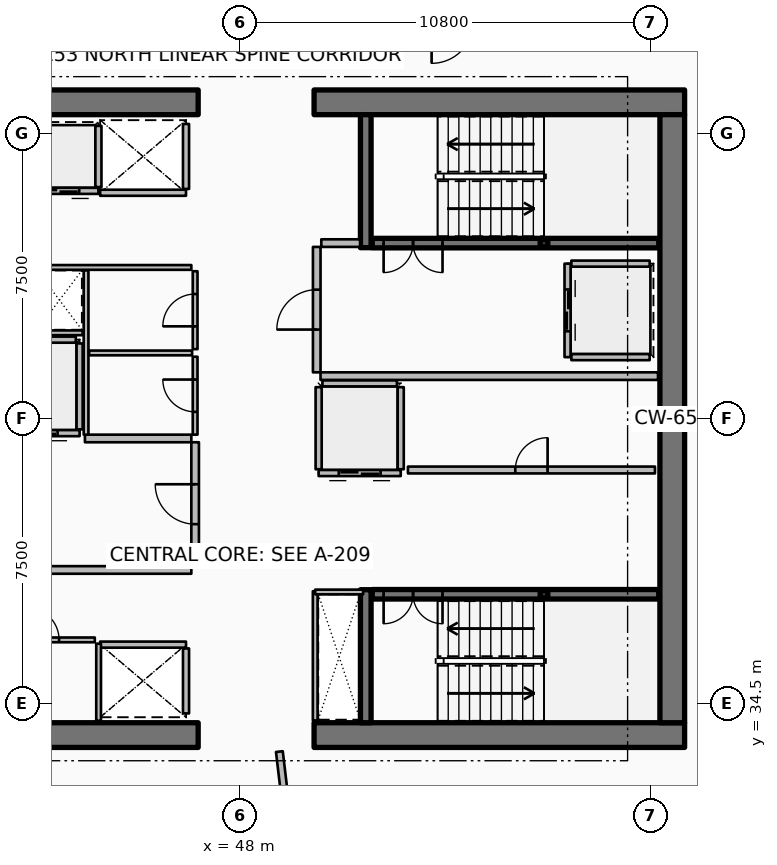
"""IFC4 building model, lengths in metres.
Left out: names, types, materials, properties, quantities, classifications, styles, units other than length and angle.
Written with IfcOpenShell. Run it as: python <this file> out.ifc"""

import sys

from ifc_helpers import new_model, si_unit, direction, frame, frame_2d, origin, origin_2d, place, context, subcontext, project, spatial, rectangle, hollow_rectangle, extrude, element, fill, save


model = new_model("IFC4")
c1 = context("Model", 3, precision=1e-05, world=origin(), true_north=direction((0.0, 1.0)))
c2 = subcontext(c1, "Body", "Model", "MODEL_VIEW")
j1 = project(units=[si_unit("LENGTHUNIT", "METRE"), si_unit("PLANEANGLEUNIT", "RADIAN")], contexts=[c1])
p1 = place(None, origin())
s1 = spatial("IfcSite", under=j1, at=p1, CompositionType="ELEMENT")
p2 = place(p1, origin())
s2 = spatial("IfcBuilding", under=s1, at=p2, CompositionType="ELEMENT")
p3 = place(p2, frame((0.0, 0.0, 210.3)))
s3 = spatial("IfcBuildingStorey", under=s2, at=p3, CompositionType="ELEMENT", Elevation=210.3)
for number, where, z_axis, x_axis in (
    (1, (37.15, 33.675, 0.0), (0.0, 0.0, 1.0), (1.0, 0.0, 0.0)),
    (2, (49.95, 33.675, 0.0), (0.0, 0.0, 1.0), (1.0, 0.0, 0.0)),
    (3, (37.15, 50.325, 0.0), (0.0, 0.0, 1.0), (1.0, 0.0, 0.0)),
    (4, (49.95, 50.325, 0.0), (0.0, 0.0, 1.0), (1.0, 0.0, 0.0)),
):
    element("IfcWall", number, at=place(p3, frame(where, z_axis=z_axis, x_axis=x_axis)), inside=s3, PredefinedType="SHEAR", context=c2, shape_type="SweptSolid", body=[
        extrude(rectangle(XDim=9.75, YDim=0.65, at=frame_2d((4.875, 0.0))), origin(), (0.0, 0.0, 1.0), 3.75),
    ])
p4 = place(p3, frame((59.375, 34.0, 0.0), z_axis=(0.0, 0.0, 1.0), x_axis=(0.0, 1.0, 0.0)))
e5 = element("IfcWall", 5, at=p4, inside=s3, PredefinedType="SHEAR", context=c2, shape_type="SweptSolid", body=[
    extrude(rectangle(XDim=16.0, YDim=0.65, at=frame_2d((8.0, 0.0))), origin(), (0.0, 0.0, 1.0), 3.75),
])
for number, where, z_axis, x_axis in (
    (6, (51.31, 46.5, 0.0), (0.0, 0.0, 1.0), (0.0, 1.0, 0.0)),
    (7, (51.31, 34.0, 0.0), (0.0, 0.0, 1.0), (0.0, 1.0, 0.0)),
):
    element("IfcWall", number, at=place(p3, frame(where, z_axis=z_axis, x_axis=x_axis)), inside=s3, PredefinedType="SHEAR", context=c2, shape_type="SweptSolid", body=[
        extrude(rectangle(XDim=3.5, YDim=0.28, at=frame_2d((1.75, 0.0))), origin(), (0.0, 0.0, 1.0), 3.75),
    ])
for number, where, z_axis, x_axis in (
    (8, (56.0, 46.62, 0.0), (0.0, 0.0, 1.0), (1.0, 0.0, 0.0)),
    (9, (56.0, 37.38, 0.0), (0.0, 0.0, 1.0), (1.0, 0.0, 0.0)),
):
    element("IfcColumn", number, at=place(p3, frame(where, z_axis=z_axis, x_axis=x_axis)), inside=s3, PredefinedType="COLUMN", context=c2, shape_type="SweptSolid", body=[
        extrude(hollow_rectangle(XDim=0.2, YDim=0.2, WallThickness=0.01, InnerFilletRadius=0.01, OuterFilletRadius=0.02, at=origin_2d()), origin(), (0.0, 0.0, 1.0), 1.67),
    ])
p5 = place(p3, frame((51.48, 46.62, 0.0), z_axis=(0.0, 0.0, 1.0), x_axis=(1.0, 0.0, 0.0)))
e10 = element("IfcWall", 10, at=p5, inside=s3, PredefinedType="SOLIDWALL", context=c2, shape_type="SweptSolid", body=[
    extrude(rectangle(XDim=7.54, YDim=0.25, at=frame_2d((3.77, 0.0))), origin(), (0.0, 0.0, 1.0), 3.5),
])
p6 = place(p5, frame((0.3, 0.0, 0.0)))
e11 = element("IfcOpeningElement", 11, at=p6, cuts=e10, PredefinedType="OPENING", context=c2, shape_type="SweptSolid", body=[
    extrude(rectangle(XDim=1.55, YDim=2.15, at=frame_2d((0.775, 1.075))), frame((0.0, 0.135, 0.0), z_axis=(0.0, -1.0, 0.0), x_axis=(1.0, 0.0, 0.0)), (0.0, 0.0, 1.0), 0.27),
])
p7 = place(p3, frame((51.48, 37.38, 0.0), z_axis=(0.0, 0.0, 1.0), x_axis=(1.0, 0.0, 0.0)))
e12 = element("IfcWall", 12, at=p7, inside=s3, PredefinedType="SOLIDWALL", context=c2, shape_type="SweptSolid", body=[
    extrude(rectangle(XDim=7.54, YDim=0.25, at=frame_2d((3.77, 0.0))), origin(), (0.0, 0.0, 1.0), 3.5),
])
p8 = place(p7, frame((0.3, 0.0, 0.0)))
e13 = element("IfcOpeningElement", 13, at=p8, cuts=e12, PredefinedType="OPENING", context=c2, shape_type="SweptSolid", body=[
    extrude(rectangle(XDim=1.55, YDim=2.15, at=frame_2d((0.775, 1.075))), frame((0.0, 0.135, 0.0), z_axis=(0.0, -1.0, 0.0), x_axis=(1.0, 0.0, 0.0)), (0.0, 0.0, 1.0), 0.27),
])
p9 = place(p3, frame((44.275, 47.995, 0.0), z_axis=(0.0, 0.0, 1.0), x_axis=(-1.0, 0.0, 0.0)))
e14 = element("IfcWall", 14, at=p9, inside=s3, PredefinedType="PARTITIONING", context=c2, shape_type="SweptSolid", body=[
    extrude(rectangle(XDim=2.11, YDim=0.16, at=frame_2d((1.055, 0.0))), origin(), (0.0, 0.0, 1.0), 3.5),
])
p10 = place(p9, frame((0.505, 0.0, 0.0)))
e15 = element("IfcOpeningElement", 15, at=p10, cuts=e14, PredefinedType="OPENING", context=c2, shape_type="SweptSolid", body=[
    extrude(rectangle(XDim=1.1, YDim=2.1, at=frame_2d((0.55, 1.05))), frame((0.0, 0.09, 0.0), z_axis=(0.0, -1.0, 0.0), x_axis=(1.0, 0.0, 0.0)), (0.0, 0.0, 1.0), 0.18),
])
p11 = place(p3, frame((44.275, 48.095, 0.0), z_axis=(0.0, 0.0, 1.0), x_axis=(0.0, 1.0, 0.0)))
e16 = element("IfcWall", 16, at=p11, inside=s3, PredefinedType="PARTITIONING", context=c2, shape_type="SweptSolid", body=[
    extrude(rectangle(XDim=1.61, YDim=0.16, at=frame_2d((0.805, 0.0))), origin(), (0.0, 0.0, 1.0), 3.5),
])
p12 = place(p3, frame((46.58, 47.945, 0.0), z_axis=(0.0, 0.0, 1.0), x_axis=(-1.0, 0.0, 0.0)))
e17 = element("IfcWall", 17, at=p12, inside=s3, PredefinedType="PARTITIONING", context=c2, shape_type="SweptSolid", body=[
    extrude(rectangle(XDim=2.26, YDim=0.16, at=frame_2d((1.13, 0.0))), origin(), (0.0, 0.0, 1.0), 3.5),
])
p13 = place(p3, frame((46.58, 48.045, 0.0), z_axis=(0.0, 0.0, 1.0), x_axis=(0.0, 1.0, 0.0)))
e18 = element("IfcWall", 18, at=p13, inside=s3, PredefinedType="PARTITIONING", context=c2, shape_type="SweptSolid", body=[
    extrude(rectangle(XDim=1.71, YDim=0.16, at=frame_2d((0.855, 0.0))), origin(), (0.0, 0.0, 1.0), 3.5),
])
p14 = place(p3, frame((44.32, 36.055, 0.0), z_axis=(0.0, 0.0, 1.0), x_axis=(1.0, 0.0, 0.0)))
e19 = element("IfcWall", 19, at=p14, inside=s3, PredefinedType="PARTITIONING", context=c2, shape_type="SweptSolid", body=[
    extrude(rectangle(XDim=2.26, YDim=0.16, at=frame_2d((1.13, 0.0))), origin(), (0.0, 0.0, 1.0), 3.5),
])
p15 = place(p3, frame((46.58, 34.245, 0.0), z_axis=(0.0, 0.0, 1.0), x_axis=(0.0, 1.0, 0.0)))
e20 = element("IfcWall", 20, at=p15, inside=s3, PredefinedType="PARTITIONING", context=c2, shape_type="SweptSolid", body=[
    extrude(rectangle(XDim=1.71, YDim=0.16, at=frame_2d((0.855, 0.0))), origin(), (0.0, 0.0, 1.0), 3.5),
])
p16 = place(p3, frame((43.78, 41.62, 0.0), z_axis=(0.0, 0.0, 1.0), x_axis=(-1.0, 0.0, 0.0)))
e21 = element("IfcWall", 21, at=p16, inside=s3, PredefinedType="PARTITIONING", context=c2, shape_type="SweptSolid", body=[
    extrude(rectangle(XDim=2.26, YDim=0.16, at=frame_2d((1.13, 0.0))), origin(), (0.0, 0.0, 1.0), 3.5),
])
p17 = place(p16, frame((0.58, 0.0, 0.0)))
e22 = element("IfcOpeningElement", 22, at=p17, cuts=e21, PredefinedType="OPENING", context=c2, shape_type="SweptSolid", body=[
    extrude(rectangle(XDim=1.1, YDim=2.1, at=frame_2d((0.55, 1.05))), frame((0.0, 0.09, 0.0), z_axis=(0.0, -1.0, 0.0), x_axis=(1.0, 0.0, 0.0)), (0.0, 0.0, 1.0), 0.18),
])
p18 = place(p3, frame((43.78, 41.72, 0.0), z_axis=(0.0, 0.0, 1.0), x_axis=(0.0, 1.0, 0.0)))
e23 = element("IfcWall", 23, at=p18, inside=s3, PredefinedType="PARTITIONING", context=c2, shape_type="SweptSolid", body=[
    extrude(rectangle(XDim=2.26, YDim=0.16, at=frame_2d((1.13, 0.0))), origin(), (0.0, 0.0, 1.0), 3.5),
])
p19 = place(p3, frame((41.62, 44.08, 0.0), z_axis=(0.0, 0.0, 1.0), x_axis=(1.0, 0.0, 0.0)))
e24 = element("IfcWall", 24, at=p19, inside=s3, PredefinedType="PARTITIONING", context=c2, shape_type="SweptSolid", body=[
    extrude(rectangle(XDim=2.06, YDim=0.16, at=frame_2d((1.03, 0.0))), origin(), (0.0, 0.0, 1.0), 3.5),
])
p20 = place(p3, frame((56.62, 46.08, 0.0), z_axis=(0.0, 0.0, 1.0), x_axis=(0.0, -1.0, 0.0)))
e25 = element("IfcWall", 25, at=p20, inside=s3, PredefinedType="PARTITIONING", context=c2, shape_type="SweptSolid", body=[
    extrude(rectangle(XDim=2.46, YDim=0.16, at=frame_2d((1.23, 0.0))), origin(), (0.0, 0.0, 1.0), 3.5),
])
p21 = place(p20, frame((0.68, 0.0, 0.0)))
e26 = element("IfcOpeningElement", 26, at=p21, cuts=e25, PredefinedType="OPENING", context=c2, shape_type="SweptSolid", body=[
    extrude(rectangle(XDim=1.1, YDim=2.1, at=frame_2d((0.55, 1.05))), frame((0.0, 0.09, 0.0), z_axis=(0.0, -1.0, 0.0), x_axis=(1.0, 0.0, 0.0)), (0.0, 0.0, 1.0), 0.18),
])
for number, where, z_axis, x_axis in (
    (27, (56.72, 46.08, 0.0), (0.0, 0.0, 1.0), (1.0, 0.0, 0.0)),
    (28, (56.72, 43.62, 0.0), (0.0, 0.0, 1.0), (1.0, 0.0, 0.0)),
):
    element("IfcWall", number, at=place(p3, frame(where, z_axis=z_axis, x_axis=x_axis)), inside=s3, PredefinedType="PARTITIONING", context=c2, shape_type="SweptSolid", body=[
        extrude(rectangle(XDim=2.06, YDim=0.16, at=frame_2d((1.03, 0.0))), origin(), (0.0, 0.0, 1.0), 3.5),
    ])
p22 = place(p3, frame((52.23, 40.57, 0.0), z_axis=(0.0, 0.0, 1.0), x_axis=(-1.0, 0.0, 0.0)))
e29 = element("IfcWall", 29, at=p22, inside=s3, PredefinedType="PARTITIONING", context=c2, shape_type="SweptSolid", body=[
    extrude(rectangle(XDim=2.16, YDim=0.16, at=frame_2d((1.08, 0.0))), origin(), (0.0, 0.0, 1.0), 3.5),
])
p23 = place(p22, frame((0.53, 0.0, 0.0)))
e30 = element("IfcOpeningElement", 30, at=p23, cuts=e29, PredefinedType="OPENING", context=c2, shape_type="SweptSolid", body=[
    extrude(rectangle(XDim=1.1, YDim=2.1, at=frame_2d((0.55, 1.05))), frame((0.0, 0.09, 0.0), z_axis=(0.0, -1.0, 0.0), x_axis=(1.0, 0.0, 0.0)), (0.0, 0.0, 1.0), 0.18),
])
for number, where, z_axis, x_axis in (
    (31, (52.23, 40.67, 0.0), (0.0, 0.0, 1.0), (0.0, 1.0, 0.0)),
    (32, (50.07, 40.67, 0.0), (0.0, 0.0, 1.0), (0.0, 1.0, 0.0)),
):
    element("IfcWall", number, at=place(p3, frame(where, z_axis=z_axis, x_axis=x_axis)), inside=s3, PredefinedType="PARTITIONING", context=c2, shape_type="SweptSolid", body=[
        extrude(rectangle(XDim=2.16, YDim=0.16, at=frame_2d((1.08, 0.0))), origin(), (0.0, 0.0, 1.0), 3.5),
    ])
p24 = place(p3, frame((50.17, 42.93, 0.0), z_axis=(0.0, 0.0, 1.0), x_axis=(1.0, 0.0, 0.0)))
e33 = element("IfcWall", 33, at=p24, inside=s3, PredefinedType="PARTITIONING", context=c2, shape_type="SweptSolid", body=[
    extrude(rectangle(XDim=1.96, YDim=0.16, at=frame_2d((0.98, 0.0))), origin(), (0.0, 0.0, 1.0), 3.5),
])
p25 = place(p3, frame((52.42, 40.65, 0.0), z_axis=(0.0, 0.0, 1.0), x_axis=(1.0, 0.0, 0.0)))
e34 = element("IfcWall", 34, at=p25, inside=s3, PredefinedType="PARTITIONING", context=c2, shape_type="SweptSolid", body=[
    extrude(rectangle(XDim=6.5, YDim=0.18, at=frame_2d((3.25, 0.0))), origin(), (0.0, 0.0, 1.0), 3.5),
])
p26 = place(p25, frame((2.825, 0.0, 0.0)))
e35 = element("IfcOpeningElement", 35, at=p26, cuts=e34, PredefinedType="OPENING", context=c2, shape_type="SweptSolid", body=[
    extrude(rectangle(XDim=0.85, YDim=2.06, at=frame_2d((0.425, 1.03))), frame((0.0, 0.1, 0.0), z_axis=(0.0, -1.0, 0.0), x_axis=(1.0, 0.0, 0.0)), (0.0, 0.0, 1.0), 0.2),
])
p27 = place(p3, frame((44.28, 34.05, 0.0), z_axis=(0.0, 0.0, 1.0), x_axis=(0.0, 1.0, 0.0)))
e36 = element("IfcWall", 36, at=p27, inside=s3, PredefinedType="PARTITIONING", context=c2, shape_type="SweptSolid", body=[
    extrude(rectangle(XDim=2.03, YDim=0.125, at=frame_2d((1.015, 0.0))), origin(), (0.0, 0.0, 1.0), 2.94),
])
p28 = place(p3, frame((41.45, 36.18, 0.0), z_axis=(0.0, 0.0, 1.0), x_axis=(1.0, 0.0, 0.0)))
e37 = element("IfcWall", 37, at=p28, inside=s3, PredefinedType="PARTITIONING", context=c2, shape_type="SweptSolid", body=[
    extrude(rectangle(XDim=2.73, YDim=0.125, at=frame_2d((1.365, 0.0))), origin(), (0.0, 0.0, 1.0), 2.94),
])
p29 = place(p28, frame((0.94, 0.0, 0.0)))
e38 = element("IfcOpeningElement", 38, at=p29, cuts=e37, PredefinedType="OPENING", context=c2, shape_type="SweptSolid", body=[
    extrude(rectangle(XDim=0.85, YDim=2.06, at=frame_2d((0.425, 1.03))), frame((0.0, 0.073, 0.0), z_axis=(0.0, -1.0, 0.0), x_axis=(1.0, 0.0, 0.0)), (0.0, 0.0, 1.0), 0.145),
])
p30 = place(p3, frame((41.35, 38.02, 0.0), z_axis=(0.0, 0.0, 1.0), x_axis=(1.0, 0.0, 0.0)))
e39 = element("IfcWall", 39, at=p30, inside=s3, PredefinedType="PARTITIONING", context=c2, shape_type="SweptSolid", body=[
    extrude(rectangle(XDim=5.37, YDim=0.2, at=frame_2d((2.685, 0.0))), origin(), (0.0, 0.0, 1.0), 3.5),
])
p31 = place(p3, frame((43.92, 41.48, 0.0), z_axis=(0.0, 0.0, 1.0), x_axis=(1.0, 0.0, 0.0)))
e40 = element("IfcWall", 40, at=p31, inside=s3, PredefinedType="PARTITIONING", context=c2, shape_type="SweptSolid", body=[
    extrude(rectangle(XDim=2.8, YDim=0.2, at=frame_2d((1.4, 0.0))), origin(), (0.0, 0.0, 1.0), 3.5),
])
p32 = place(p3, frame((46.82, 38.12, 0.0), z_axis=(0.0, 0.0, 1.0), x_axis=(0.0, 1.0, 0.0)))
e41 = element("IfcWall", 41, at=p32, inside=s3, PredefinedType="PARTITIONING", context=c2, shape_type="SweptSolid", body=[
    extrude(rectangle(XDim=3.26, YDim=0.2, at=frame_2d((1.63, 0.0))), origin(), (0.0, 0.0, 1.0), 3.5),
])
p33 = place(p32, frame((1.105, 0.0, 0.0)))
e42 = element("IfcOpeningElement", 42, at=p33, cuts=e41, PredefinedType="OPENING", context=c2, shape_type="SweptSolid", body=[
    extrude(rectangle(XDim=1.05, YDim=2.1, at=frame_2d((0.525, 1.05))), frame((0.0, 0.11, 0.0), z_axis=(0.0, -1.0, 0.0), x_axis=(1.0, 0.0, 0.0)), (0.0, 0.0, 1.0), 0.22),
])
p34 = place(p3, frame((50.12, 43.12, 0.0), z_axis=(0.0, 0.0, 1.0), x_axis=(1.0, 0.0, 0.0)))
e43 = element("IfcWall", 43, at=p34, inside=s3, PredefinedType="PARTITIONING", context=c2, shape_type="SweptSolid", body=[
    extrude(rectangle(XDim=8.88, YDim=0.2, at=frame_2d((4.44, 0.0))), origin(), (0.0, 0.0, 1.0), 3.5),
])
p35 = place(p3, frame((50.14, 46.62, 0.0), z_axis=(0.0, 0.0, 1.0), x_axis=(1.0, 0.0, 0.0)))
e44 = element("IfcWall", 44, at=p35, inside=s3, PredefinedType="PARTITIONING", context=c2, shape_type="SweptSolid", body=[
    extrude(rectangle(XDim=1.02, YDim=0.2, at=frame_2d((0.51, 0.0))), origin(), (0.0, 0.0, 1.0), 3.5),
])
p36 = place(p3, frame((50.02, 43.22, 0.0), z_axis=(0.0, 0.0, 1.0), x_axis=(0.0, 1.0, 0.0)))
e45 = element("IfcWall", 45, at=p36, inside=s3, PredefinedType="PARTITIONING", context=c2, shape_type="SweptSolid", body=[
    extrude(rectangle(XDim=3.3, YDim=0.2, at=frame_2d((1.65, 0.0))), origin(), (0.0, 0.0, 1.0), 3.5),
])
p37 = place(p36, frame((1.125, 0.0, 0.0)))
e46 = element("IfcOpeningElement", 46, at=p37, cuts=e45, PredefinedType="OPENING", context=c2, shape_type="SweptSolid", body=[
    extrude(rectangle(XDim=1.05, YDim=2.1, at=frame_2d((0.525, 1.05))), frame((0.0, 0.11, 0.0), z_axis=(0.0, -1.0, 0.0), x_axis=(1.0, 0.0, 0.0)), (0.0, 0.0, 1.0), 0.22),
])
p38 = place(p3, frame((41.36, 45.98, 0.0), z_axis=(0.0, 0.0, 1.0), x_axis=(1.0, 0.0, 0.0)))
e47 = element("IfcWall", 47, at=p38, inside=s3, PredefinedType="PARTITIONING", context=c2, shape_type="SweptSolid", body=[
    extrude(rectangle(XDim=5.36, YDim=0.125, at=frame_2d((2.68, 0.0))), origin(), (0.0, 0.0, 1.0), 2.94),
])
p39 = place(p3, frame((41.36, 44.26, 0.0), z_axis=(0.0, 0.0, 1.0), x_axis=(1.0, 0.0, 0.0)))
e48 = element("IfcWall", 48, at=p39, inside=s3, PredefinedType="PARTITIONING", context=c2, shape_type="SweptSolid", body=[
    extrude(rectangle(XDim=2.5, YDim=0.125, at=frame_2d((1.25, 0.0))), origin(), (0.0, 0.0, 1.0), 2.94),
])
p40 = place(p3, frame((49.98, 34.06, 0.0), z_axis=(0.0, 0.0, 1.0), x_axis=(0.0, 1.0, 0.0)))
e49 = element("IfcWall", 49, at=p40, inside=s3, PredefinedType="PARTITIONING", context=c2, shape_type="SweptSolid", body=[
    extrude(rectangle(XDim=3.4, YDim=0.125, at=frame_2d((1.7, 0.0))), origin(), (0.0, 0.0, 1.0), 2.94),
])
p41 = place(p3, frame((49.98, 37.44, 0.0), z_axis=(0.0, 0.0, 1.0), x_axis=(1.0, 0.0, 0.0)))
e50 = element("IfcWall", 50, at=p41, inside=s3, PredefinedType="PARTITIONING", context=c2, shape_type="SweptSolid", body=[
    extrude(rectangle(XDim=1.26, YDim=0.125, at=frame_2d((0.63, 0.0))), origin(), (0.0, 0.0, 1.0), 2.94),
])
p42 = place(p3, frame((43.95, 41.58, 0.0), z_axis=(0.0, 0.0, 1.0), x_axis=(0.0, 1.0, 0.0)))
e51 = element("IfcWall", 51, at=p42, inside=s3, PredefinedType="PARTITIONING", context=c2, shape_type="SweptSolid", body=[
    extrude(rectangle(XDim=4.32, YDim=0.125, at=frame_2d((2.16, 0.0))), origin(), (0.0, 0.0, 1.0), 2.94),
])
p43 = place(p3, frame((44.03, 43.73, 0.0), z_axis=(0.0, 0.0, 1.0), x_axis=(1.0, 0.0, 0.0)))
e52 = element("IfcWall", 52, at=p43, inside=s3, PredefinedType="PARTITIONING", context=c2, shape_type="SweptSolid", body=[
    extrude(rectangle(XDim=2.71, YDim=0.125, at=frame_2d((1.355, 0.0))), origin(), (0.0, 0.0, 1.0), 2.94),
])
p44 = place(p3, frame((46.82, 41.58, 0.0), z_axis=(0.0, 0.0, 1.0), x_axis=(0.0, 1.0, 0.0)))
e53 = element("IfcWall", 53, at=p44, inside=s3, PredefinedType="PARTITIONING", context=c2, shape_type="SweptSolid", body=[
    extrude(rectangle(XDim=2.05, YDim=0.125, at=frame_2d((1.025, 0.0))), origin(), (0.0, 0.0, 1.0), 2.94),
])
p45 = place(p44, frame((0.6, 0.0, 0.0)))
e54 = element("IfcOpeningElement", 54, at=p45, cuts=e53, PredefinedType="OPENING", context=c2, shape_type="SweptSolid", body=[
    extrude(rectangle(XDim=0.85, YDim=2.06, at=frame_2d((0.425, 1.03))), frame((0.0, 0.073, 0.0), z_axis=(0.0, -1.0, 0.0), x_axis=(1.0, 0.0, 0.0)), (0.0, 0.0, 1.0), 0.145),
])
p46 = place(p3, frame((46.82, 43.83, 0.0), z_axis=(0.0, 0.0, 1.0), x_axis=(0.0, 1.0, 0.0)))
e55 = element("IfcWall", 55, at=p46, inside=s3, PredefinedType="PARTITIONING", context=c2, shape_type="SweptSolid", body=[
    extrude(rectangle(XDim=2.05, YDim=0.125, at=frame_2d((1.025, 0.0))), origin(), (0.0, 0.0, 1.0), 2.94),
])
p47 = place(p46, frame((0.6, 0.0, 0.0)))
e56 = element("IfcOpeningElement", 56, at=p47, cuts=e55, PredefinedType="OPENING", context=c2, shape_type="SweptSolid", body=[
    extrude(rectangle(XDim=0.85, YDim=2.06, at=frame_2d((0.425, 1.03))), frame((0.0, 0.073, 0.0), z_axis=(0.0, -1.0, 0.0), x_axis=(1.0, 0.0, 0.0)), (0.0, 0.0, 1.0), 0.145),
])
p48 = place(p3, frame((49.037, 33.241, 0.0), z_axis=(0.0, 0.0, 1.0), x_axis=(0.11753742895, -0.993068453228, 0.0)))
e57 = element("IfcWall", 57, at=p48, inside=s3, PredefinedType="PARTITIONING", context=c2, shape_type="SweptSolid", body=[
    extrude(rectangle(XDim=13.815, YDim=0.18, at=frame_2d((6.907, 0.0))), origin(), (0.0, 0.0, 1.0), 2.94),
])
p49 = place(p6, origin())
e58 = element("IfcDoor", 58, at=p49, inside=s3, OperationType="DOUBLE_DOOR_SINGLE_SWING", PredefinedType="DOOR", context=c2, shape_type="SweptSolid", body=[
    extrude(rectangle(XDim=1.55, YDim=2.15, at=frame_2d((0.775, 1.075))), frame((0.0, 0.025, 0.0), z_axis=(0.0, -1.0, 0.0), x_axis=(1.0, 0.0, 0.0)), (0.0, 0.0, 1.0), 0.05),
])
fill(e11, e58)
p50 = place(p8, origin())
e59 = element("IfcDoor", 59, at=p50, inside=s3, OperationType="DOUBLE_DOOR_SINGLE_SWING", PredefinedType="DOOR", context=c2, shape_type="SweptSolid", body=[
    extrude(rectangle(XDim=1.55, YDim=2.15, at=frame_2d((0.775, 1.075))), frame((0.0, 0.025, 0.0), z_axis=(0.0, -1.0, 0.0), x_axis=(1.0, 0.0, 0.0)), (0.0, 0.0, 1.0), 0.05),
])
fill(e13, e59)
p51 = place(p10, origin())
e60 = element("IfcDoor", 60, at=p51, inside=s3, OperationType="DOUBLE_DOOR_SLIDING", PredefinedType="DOOR", context=c2, shape_type="SweptSolid", body=[
    extrude(rectangle(XDim=1.1, YDim=2.1, at=frame_2d((0.55, 1.05))), frame((0.0, 0.025, 0.0), z_axis=(0.0, -1.0, 0.0), x_axis=(1.0, 0.0, 0.0)), (0.0, 0.0, 1.0), 0.05),
])
fill(e15, e60)
p52 = place(p17, origin())
e61 = element("IfcDoor", 61, at=p52, inside=s3, OperationType="DOUBLE_DOOR_SLIDING", PredefinedType="DOOR", context=c2, shape_type="SweptSolid", body=[
    extrude(rectangle(XDim=1.1, YDim=2.1, at=frame_2d((0.55, 1.05))), frame((0.0, 0.025, 0.0), z_axis=(0.0, -1.0, 0.0), x_axis=(1.0, 0.0, 0.0)), (0.0, 0.0, 1.0), 0.05),
])
fill(e22, e61)
p53 = place(p21, origin())
e62 = element("IfcDoor", 62, at=p53, inside=s3, OperationType="DOUBLE_DOOR_SLIDING", PredefinedType="DOOR", context=c2, shape_type="SweptSolid", body=[
    extrude(rectangle(XDim=1.1, YDim=2.1, at=frame_2d((0.55, 1.05))), frame((0.0, 0.025, 0.0), z_axis=(0.0, -1.0, 0.0), x_axis=(1.0, 0.0, 0.0)), (0.0, 0.0, 1.0), 0.05),
])
fill(e26, e62)
p54 = place(p23, origin())
e63 = element("IfcDoor", 63, at=p54, inside=s3, OperationType="DOUBLE_DOOR_SLIDING", PredefinedType="DOOR", context=c2, shape_type="SweptSolid", body=[
    extrude(rectangle(XDim=1.1, YDim=2.1, at=frame_2d((0.55, 1.05))), frame((0.0, 0.025, 0.0), z_axis=(0.0, -1.0, 0.0), x_axis=(1.0, 0.0, 0.0)), (0.0, 0.0, 1.0), 0.05),
])
fill(e30, e63)
p55 = place(p26, origin())
e64 = element("IfcDoor", 64, at=p55, inside=s3, OperationType="SINGLE_SWING_RIGHT", PredefinedType="DOOR", context=c2, shape_type="SweptSolid", body=[
    extrude(rectangle(XDim=0.85, YDim=2.06, at=frame_2d((0.425, 1.03))), frame((0.0, 0.025, 0.0), z_axis=(0.0, -1.0, 0.0), x_axis=(1.0, 0.0, 0.0)), (0.0, 0.0, 1.0), 0.05),
])
fill(e35, e64)
p56 = place(p29, origin())
e65 = element("IfcDoor", 65, at=p56, inside=s3, OperationType="SINGLE_SWING_LEFT", PredefinedType="DOOR", context=c2, shape_type="SweptSolid", body=[
    extrude(rectangle(XDim=0.85, YDim=2.06, at=frame_2d((0.425, 1.03))), frame((0.0, 0.025, 0.0), z_axis=(0.0, -1.0, 0.0), x_axis=(1.0, 0.0, 0.0)), (0.0, 0.0, 1.0), 0.05),
])
fill(e38, e65)
p57 = place(p33, origin())
e66 = element("IfcDoor", 66, at=p57, inside=s3, OperationType="SINGLE_SWING_RIGHT", PredefinedType="DOOR", context=c2, shape_type="SweptSolid", body=[
    extrude(rectangle(XDim=1.05, YDim=2.1, at=frame_2d((0.525, 1.05))), frame((0.0, 0.025, 0.0), z_axis=(0.0, -1.0, 0.0), x_axis=(1.0, 0.0, 0.0)), (0.0, 0.0, 1.0), 0.05),
])
fill(e42, e66)
p58 = place(p37, origin())
e67 = element("IfcDoor", 67, at=p58, inside=s3, OperationType="SINGLE_SWING_LEFT", PredefinedType="DOOR", context=c2, shape_type="SweptSolid", body=[
    extrude(rectangle(XDim=1.05, YDim=2.1, at=frame_2d((0.525, 1.05))), frame((0.0, 0.025, 0.0), z_axis=(0.0, -1.0, 0.0), x_axis=(1.0, 0.0, 0.0)), (0.0, 0.0, 1.0), 0.05),
])
fill(e46, e67)
p59 = place(p45, origin())
e68 = element("IfcDoor", 68, at=p59, inside=s3, OperationType="SINGLE_SWING_RIGHT", PredefinedType="DOOR", context=c2, shape_type="SweptSolid", body=[
    extrude(rectangle(XDim=0.85, YDim=2.06, at=frame_2d((0.425, 1.03))), frame((0.0, 0.025, 0.0), z_axis=(0.0, -1.0, 0.0), x_axis=(1.0, 0.0, 0.0)), (0.0, 0.0, 1.0), 0.05),
])
fill(e54, e68)
p60 = place(p47, origin())
e69 = element("IfcDoor", 69, at=p60, inside=s3, OperationType="SINGLE_SWING_LEFT", PredefinedType="DOOR", context=c2, shape_type="SweptSolid", body=[
    extrude(rectangle(XDim=0.85, YDim=2.06, at=frame_2d((0.425, 1.03))), frame((0.0, 0.025, 0.0), z_axis=(0.0, -1.0, 0.0), x_axis=(1.0, 0.0, 0.0)), (0.0, 0.0, 1.0), 0.05),
])
fill(e56, e69)
save(model, sys.argv[1])
